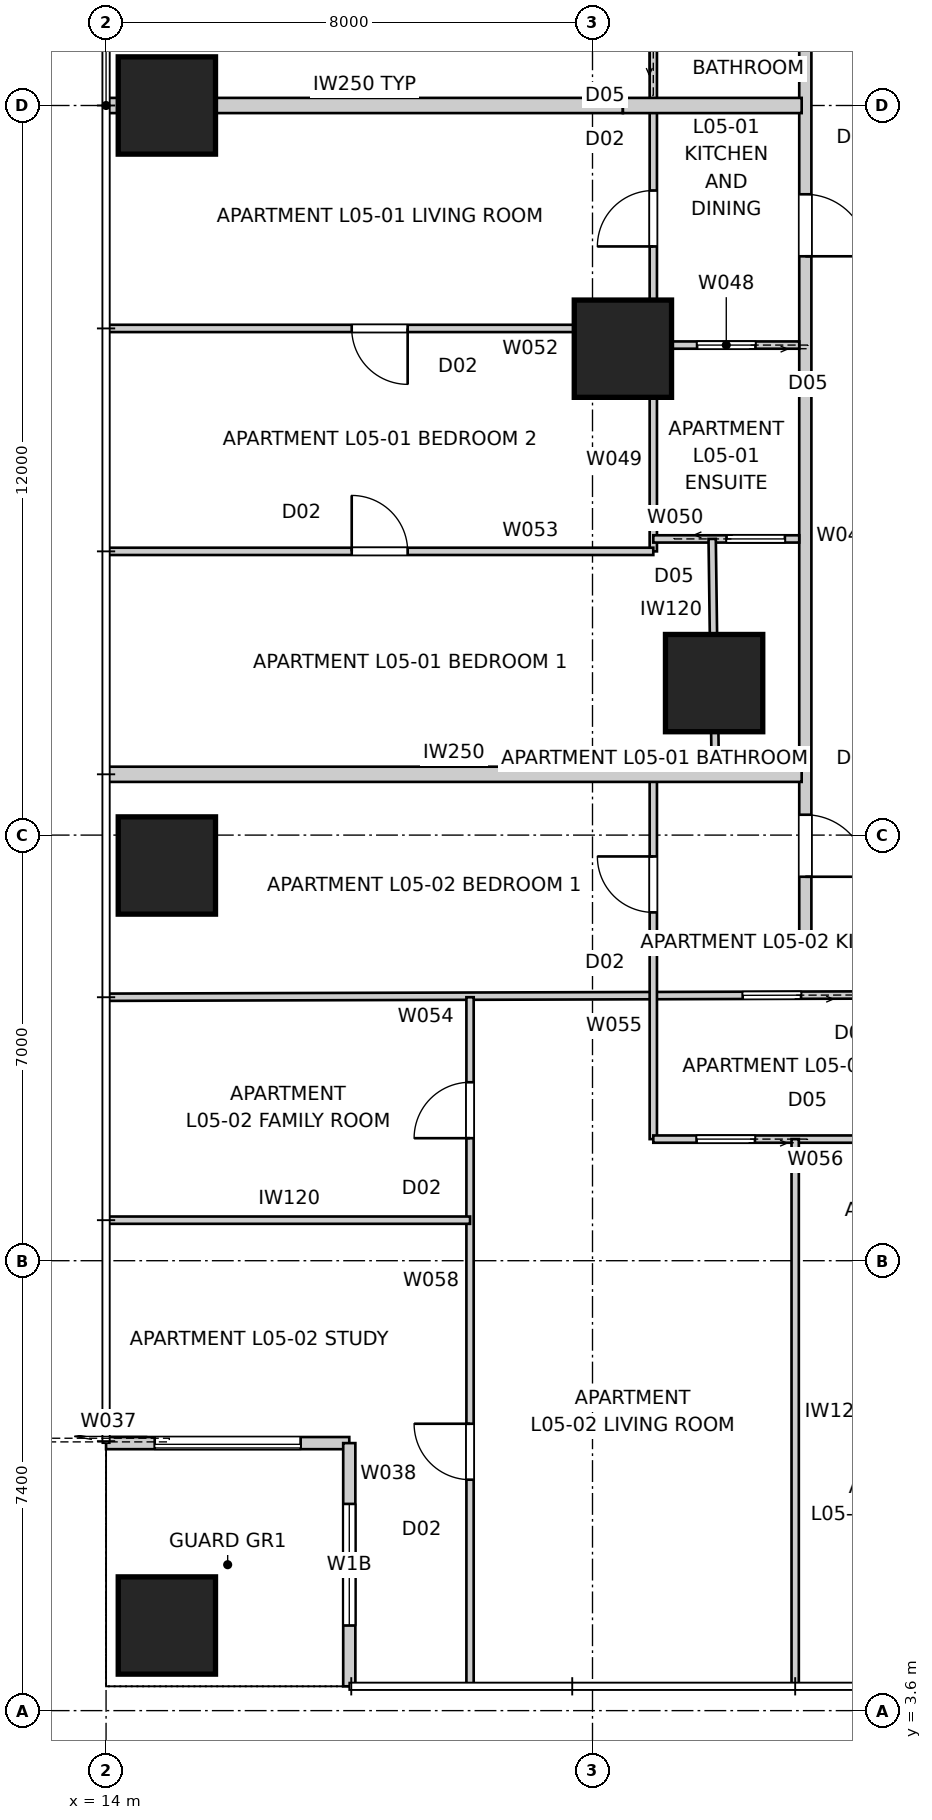
"""IFC4 building model, lengths in metres.
Left out: names, types, materials, properties, quantities, classifications, styles, units other than length and angle.
Written with IfcOpenShell. Run it as: python <this file> out.ifc"""

import sys

from ifc_helpers import new_model, si_unit, direction, frame, frame_2d, origin, origin_2d, place, context, subcontext, project, spatial, rectangle, extrude, element, fill, save


model = new_model("IFC4")
c1 = context("Model", 3, precision=1e-05, world=origin(), true_north=direction((0.0, 1.0)))
c2 = subcontext(c1, "Body", "Model", "MODEL_VIEW")
j1 = project(units=[si_unit("LENGTHUNIT", "METRE"), si_unit("PLANEANGLEUNIT", "RADIAN")], contexts=[c1])
p1 = place(None, origin())
s1 = spatial("IfcSite", under=j1, at=p1, CompositionType="ELEMENT")
p2 = place(p1, origin())
s2 = spatial("IfcBuilding", under=s1, at=p2, CompositionType="ELEMENT")
p3 = place(p2, frame((0.0, 0.0, 21.8)))
s3 = spatial("IfcBuildingStorey", under=s2, at=p3, CompositionType="ELEMENT", Elevation=21.8)
for number, where, z_axis, x_axis in (
    (1, (15.0, 5.0, 0.0), (0.0, 0.0, 1.0), (1.0, 0.0, 0.0)),
    (2, (15.0, 30.0, 0.0), (0.0, 0.0, 1.0), (1.0, 0.0, 0.0)),
    (3, (15.0, 17.5, 0.0), (0.0, 0.0, 1.0), (1.0, 0.0, 0.0)),
    (4, (22.5, 26.0, 0.0), (0.0, 0.0, 1.0), (1.0, 0.0, 0.0)),
    (5, (24.0, 20.5, 0.0), (0.0, 0.0, 1.0), (1.0, 0.0, 0.0)),
):
    element("IfcColumn", number, at=place(p3, frame(where, z_axis=z_axis, x_axis=x_axis)), inside=s3, PredefinedType="COLUMN", context=c2, shape_type="SweptSolid", body=[
        extrude(rectangle(XDim=1.6, YDim=1.6, at=origin_2d()), origin(), (0.0, 0.0, 1.0), 3.4),
    ])
p4 = place(p3, frame((14.0, 8.0, 0.0), z_axis=(0.0, 0.0, 1.0), x_axis=(1.0, 0.0, 0.0)))
e6 = element("IfcWall", 6, at=p4, inside=s3, PredefinedType="SOLIDWALL", context=c2, shape_type="SweptSolid", body=[
    extrude(rectangle(XDim=4.0, YDim=0.2, at=frame_2d((2.0, 0.0))), origin(), (0.0, 0.0, 1.0), 3.25),
])
p5 = place(p4, frame((0.8, 0.0, 0.0)))
e7 = element("IfcOpeningElement", 7, at=p5, cuts=e6, PredefinedType="OPENING", context=c2, shape_type="SweptSolid", body=[
    extrude(rectangle(XDim=2.4, YDim=2.1, at=frame_2d((1.2, 1.05))), frame((0.0, 0.11, 0.0), z_axis=(0.0, -1.0, 0.0), x_axis=(1.0, 0.0, 0.0)), (0.0, 0.0, 1.0), 0.22),
])
p6 = place(p3, frame((18.0, 8.0, 0.0), z_axis=(0.0, 0.0, 1.0), x_axis=(0.0, -1.0, 0.0)))
e8 = element("IfcWall", 8, at=p6, inside=s3, PredefinedType="SOLIDWALL", context=c2, shape_type="SweptSolid", body=[
    extrude(rectangle(XDim=4.0, YDim=0.2, at=frame_2d((2.0, 0.0))), origin(), (0.0, 0.0, 1.0), 3.25),
])
p7 = place(p6, frame((1.0, 0.0, 0.45)))
e9 = element("IfcOpeningElement", 9, at=p7, cuts=e8, PredefinedType="OPENING", context=c2, shape_type="SweptSolid", body=[
    extrude(rectangle(XDim=2.0, YDim=1.8, at=frame_2d((1.0, 0.9))), frame((0.0, 0.11, 0.0), z_axis=(0.0, -1.0, 0.0), x_axis=(1.0, 0.0, 0.0)), (0.0, 0.0, 1.0), 0.22),
])
p8 = place(p3, frame((25.5, 16.3, 0.0), z_axis=(0.0, 0.0, 1.0), x_axis=(1.0, 0.0, 0.0)))
e10 = element("IfcWall", 10, at=p8, inside=s3, PredefinedType="PARTITIONING", context=c2, shape_type="SweptSolid", body=[
    extrude(rectangle(XDim=29.0, YDim=0.2, at=frame_2d((14.5, 0.0))), origin(), (0.0, 0.0, 1.0), 3.25),
])
p9 = place(p8, frame((18.734, 0.0, 0.0)))
e11 = element("IfcOpeningElement", 11, at=p9, cuts=e10, PredefinedType="OPENING", context=c2, shape_type="SweptSolid", body=[
    extrude(rectangle(XDim=1.02, YDim=2.34, at=frame_2d((0.51, 1.17))), frame((0.0, 0.11, 0.0), z_axis=(0.0, -1.0, 0.0), x_axis=(1.0, 0.0, 0.0)), (0.0, 0.0, 1.0), 0.22),
])
p10 = place(p8, frame((5.096, 0.0, 0.0)))
e12 = element("IfcOpeningElement", 12, at=p10, cuts=e10, PredefinedType="OPENING", context=c2, shape_type="SweptSolid", body=[
    extrude(rectangle(XDim=1.02, YDim=2.34, at=frame_2d((0.51, 1.17))), frame((0.0, 0.11, 0.0), z_axis=(0.0, -1.0, 0.0), x_axis=(1.0, 0.0, 0.0)), (0.0, 0.0, 1.0), 0.22),
])
p11 = place(p3, frame((25.5, 43.7, 0.0), z_axis=(0.0, 0.0, 1.0), x_axis=(0.0, -1.0, 0.0)))
e13 = element("IfcWall", 13, at=p11, inside=s3, PredefinedType="PARTITIONING", context=c2, shape_type="SweptSolid", body=[
    extrude(rectangle(XDim=27.4, YDim=0.2, at=frame_2d((13.7, 0.0))), origin(), (0.0, 0.0, 1.0), 3.25),
])
p12 = place(p11, frame((5.493, 0.0, 0.0)))
e14 = element("IfcOpeningElement", 14, at=p12, cuts=e13, PredefinedType="OPENING", context=c2, shape_type="SweptSolid", body=[
    extrude(rectangle(XDim=1.02, YDim=2.34, at=frame_2d((0.51, 1.17))), frame((0.0, 0.11, 0.0), z_axis=(0.0, -1.0, 0.0), x_axis=(1.0, 0.0, 0.0)), (0.0, 0.0, 1.0), 0.22),
])
p13 = place(p11, frame((15.16, 0.0, 0.0)))
e15 = element("IfcOpeningElement", 15, at=p13, cuts=e13, PredefinedType="OPENING", context=c2, shape_type="SweptSolid", body=[
    extrude(rectangle(XDim=1.02, YDim=2.34, at=frame_2d((0.51, 1.17))), frame((0.0, 0.11, 0.0), z_axis=(0.0, -1.0, 0.0), x_axis=(1.0, 0.0, 0.0)), (0.0, 0.0, 1.0), 0.22),
])
p14 = place(p11, frame((25.365, 0.0, 0.0)))
e16 = element("IfcOpeningElement", 16, at=p14, cuts=e13, PredefinedType="OPENING", context=c2, shape_type="SweptSolid", body=[
    extrude(rectangle(XDim=1.02, YDim=2.34, at=frame_2d((0.51, 1.17))), frame((0.0, 0.11, 0.0), z_axis=(0.0, -1.0, 0.0), x_axis=(1.0, 0.0, 0.0)), (0.0, 0.0, 1.0), 0.22),
])
p15 = place(p11, frame((1.015, 0.0, 0.0)))
e17 = element("IfcOpeningElement", 17, at=p15, cuts=e13, PredefinedType="OPENING", context=c2, shape_type="SweptSolid", body=[
    extrude(rectangle(XDim=1.02, YDim=2.34, at=frame_2d((0.51, 1.17))), frame((0.0, 0.11, 0.0), z_axis=(0.0, -1.0, 0.0), x_axis=(1.0, 0.0, 0.0)), (0.0, 0.0, 1.0), 0.22),
])
p16 = place(p3, frame((14.0, 30.0, 0.0), z_axis=(0.0, 0.0, 1.0), x_axis=(1.0, 0.0, 0.0)))
e18 = element("IfcWall", 18, at=p16, inside=s3, PredefinedType="PARTITIONING", context=c2, shape_type="SweptSolid", body=[
    extrude(rectangle(XDim=8.5, YDim=0.25, at=frame_2d((4.25, 0.0))), origin(), (0.0, 0.0, 1.0), 3.25),
])
p17 = place(p3, frame((22.5, 30.0, 0.0), z_axis=(0.0, 0.0, 1.0), x_axis=(1.0, 0.0, 0.0)))
e19 = element("IfcWall", 19, at=p17, inside=s3, PredefinedType="PARTITIONING", context=c2, shape_type="SweptSolid", body=[
    extrude(rectangle(XDim=2.94, YDim=0.25, at=frame_2d((1.47, 0.0))), origin(), (0.0, 0.0, 1.0), 2.796),
])
p18 = place(p3, frame((14.0, 19.0, 0.0), z_axis=(0.0, 0.0, 1.0), x_axis=(1.0, 0.0, 0.0)))
e20 = element("IfcWall", 20, at=p18, inside=s3, PredefinedType="PARTITIONING", context=c2, shape_type="SweptSolid", body=[
    extrude(rectangle(XDim=11.44, YDim=0.25, at=frame_2d((5.72, 0.0))), origin(), (0.0, 0.0, 1.0), 3.25),
])
p19 = place(p3, frame((25.4, 26.06, 0.0), z_axis=(0.0, 0.0, 1.0), x_axis=(-1.0, 0.0, 0.0)))
e21 = element("IfcWall", 21, at=p19, inside=s3, PredefinedType="PARTITIONING", context=c2, shape_type="SweptSolid", body=[
    extrude(rectangle(XDim=2.4, YDim=0.12, at=frame_2d((1.2, 0.0))), origin(), (0.0, 0.0, 1.0), 3.25),
])
p20 = place(p19, frame((0.72, 0.0, 0.0)))
e22 = element("IfcOpeningElement", 22, at=p20, cuts=e21, PredefinedType="OPENING", context=c2, shape_type="SweptSolid", body=[
    extrude(rectangle(XDim=0.96, YDim=2.1, at=frame_2d((0.48, 1.05))), frame((0.0, 0.07, 0.0), z_axis=(0.0, -1.0, 0.0), x_axis=(1.0, 0.0, 0.0)), (0.0, 0.0, 1.0), 0.14),
])
p21 = place(p3, frame((23.0, 22.667, 0.0), z_axis=(0.0, 0.0, 1.0), x_axis=(0.0, 1.0, 0.0)))
e23 = element("IfcWall", 23, at=p21, inside=s3, PredefinedType="PARTITIONING", context=c2, shape_type="SweptSolid", body=[
    extrude(rectangle(XDim=15.233, YDim=0.12, at=frame_2d((7.617, 0.0))), origin(), (0.0, 0.0, 1.0), 2.549),
])
p22 = place(p21, frame((13.362, 0.0, 0.0)))
e24 = element("IfcOpeningElement", 24, at=p22, cuts=e23, PredefinedType="OPENING", context=c2, shape_type="SweptSolid", body=[
    extrude(rectangle(XDim=0.92, YDim=2.34, at=frame_2d((0.46, 1.17))), frame((0.0, 0.07, 0.0), z_axis=(0.0, -1.0, 0.0), x_axis=(1.0, 0.0, 0.0)), (0.0, 0.0, 1.0), 0.14),
])
p23 = place(p21, frame((5.015, 0.0, 0.0)))
e25 = element("IfcOpeningElement", 25, at=p23, cuts=e23, PredefinedType="OPENING", context=c2, shape_type="SweptSolid", body=[
    extrude(rectangle(XDim=0.92, YDim=2.34, at=frame_2d((0.46, 1.17))), frame((0.0, 0.07, 0.0), z_axis=(0.0, -1.0, 0.0), x_axis=(1.0, 0.0, 0.0)), (0.0, 0.0, 1.0), 0.14),
])
p24 = place(p21, frame((8.362, 0.0, 0.0)))
e26 = element("IfcOpeningElement", 26, at=p24, cuts=e23, PredefinedType="OPENING", context=c2, shape_type="SweptSolid", body=[
    extrude(rectangle(XDim=0.96, YDim=2.1, at=frame_2d((0.48, 1.05))), frame((0.0, 0.07, 0.0), z_axis=(0.0, -1.0, 0.0), x_axis=(1.0, 0.0, 0.0)), (0.0, 0.0, 1.0), 0.14),
])
p25 = place(p3, frame((23.0, 22.871, 0.0), z_axis=(0.0, 0.0, 1.0), x_axis=(1.0, 0.0, 0.0)))
e27 = element("IfcWall", 27, at=p25, inside=s3, PredefinedType="PARTITIONING", context=c2, shape_type="SweptSolid", body=[
    extrude(rectangle(XDim=2.4, YDim=0.12, at=frame_2d((1.2, 0.0))), origin(), (0.0, 0.0, 1.0), 3.25),
])
p26 = place(p25, frame((1.204, 0.0, 0.0)))
e28 = element("IfcOpeningElement", 28, at=p26, cuts=e27, PredefinedType="OPENING", context=c2, shape_type="SweptSolid", body=[
    extrude(rectangle(XDim=0.96, YDim=2.1, at=frame_2d((0.48, 1.05))), frame((0.0, 0.07, 0.0), z_axis=(0.0, -1.0, 0.0), x_axis=(1.0, 0.0, 0.0)), (0.0, 0.0, 1.0), 0.14),
])
p27 = place(p3, frame((24.02, 19.0, 0.0), z_axis=(0.0, 0.0, 1.0), x_axis=(-0.013494388256, 0.999908946597, 0.0)))
e29 = element("IfcWall", 29, at=p27, inside=s3, PredefinedType="PARTITIONING", context=c2, shape_type="SweptSolid", body=[
    extrude(rectangle(XDim=3.872, YDim=0.12, at=frame_2d((1.936, 0.0))), origin(), (0.0, 0.0, 1.0), 2.549),
])
p28 = place(p3, frame((23.0, 26.333, 0.0), z_axis=(0.0, 0.0, 1.0), x_axis=(-1.0, 0.0, 0.0)))
e30 = element("IfcWall", 30, at=p28, inside=s3, PredefinedType="PARTITIONING", context=c2, shape_type="SweptSolid", body=[
    extrude(rectangle(XDim=8.96, YDim=0.12, at=frame_2d((4.48, 0.0))), origin(), (0.0, 0.0, 1.0), 3.25),
])
p29 = place(p28, frame((4.04, 0.0, 0.0)))
e31 = element("IfcOpeningElement", 31, at=p29, cuts=e30, PredefinedType="OPENING", context=c2, shape_type="SweptSolid", body=[
    extrude(rectangle(XDim=0.92, YDim=2.34, at=frame_2d((0.46, 1.17))), frame((0.0, 0.07, 0.0), z_axis=(0.0, -1.0, 0.0), x_axis=(1.0, 0.0, 0.0)), (0.0, 0.0, 1.0), 0.14),
])
p30 = place(p3, frame((14.04, 22.667, 0.0), z_axis=(0.0, 0.0, 1.0), x_axis=(1.0, 0.0, 0.0)))
e32 = element("IfcWall", 32, at=p30, inside=s3, PredefinedType="PARTITIONING", context=c2, shape_type="SweptSolid", body=[
    extrude(rectangle(XDim=8.96, YDim=0.12, at=frame_2d((4.48, 0.0))), origin(), (0.0, 0.0, 1.0), 3.25),
])
p31 = place(p30, frame((4.0, 0.0, 0.0)))
e33 = element("IfcOpeningElement", 33, at=p31, cuts=e32, PredefinedType="OPENING", context=c2, shape_type="SweptSolid", body=[
    extrude(rectangle(XDim=0.92, YDim=2.34, at=frame_2d((0.46, 1.17))), frame((0.0, 0.07, 0.0), z_axis=(0.0, -1.0, 0.0), x_axis=(1.0, 0.0, 0.0)), (0.0, 0.0, 1.0), 0.14),
])
p32 = place(p3, frame((29.0, 15.378, 0.0), z_axis=(0.0, 0.0, 1.0), x_axis=(-0.999995589081, -0.002970154664, 0.0)))
e34 = element("IfcWall", 34, at=p32, inside=s3, PredefinedType="PARTITIONING", context=c2, shape_type="SweptSolid", body=[
    extrude(rectangle(XDim=14.96, YDim=0.12, at=frame_2d((7.48, 0.0))), origin(), (0.0, 0.0, 1.0), 2.638),
])
p33 = place(p32, frame((3.57, 0.0, 0.0)))
e35 = element("IfcOpeningElement", 35, at=p33, cuts=e34, PredefinedType="OPENING", context=c2, shape_type="SweptSolid", body=[
    extrude(rectangle(XDim=0.96, YDim=2.1, at=frame_2d((0.48, 1.05))), frame((0.0, 0.07, 0.0), z_axis=(0.0, -1.0, 0.0), x_axis=(1.0, 0.0, 0.0)), (0.0, 0.0, 1.0), 0.14),
])
p34 = place(p3, frame((23.0, 13.0, 0.0), z_axis=(0.0, 0.0, 1.0), x_axis=(0.0, 1.0, 0.0)))
e36 = element("IfcWall", 36, at=p34, inside=s3, PredefinedType="PARTITIONING", context=c2, shape_type="SweptSolid", body=[
    extrude(rectangle(XDim=6.0, YDim=0.12, at=frame_2d((3.0, 0.0))), origin(), (0.0, 0.0, 1.0), 3.25),
])
p35 = place(p34, frame((3.729, 0.0, 0.0)))
e37 = element("IfcOpeningElement", 37, at=p35, cuts=e36, PredefinedType="OPENING", context=c2, shape_type="SweptSolid", body=[
    extrude(rectangle(XDim=0.92, YDim=2.34, at=frame_2d((0.46, 1.17))), frame((0.0, 0.07, 0.0), z_axis=(0.0, -1.0, 0.0), x_axis=(1.0, 0.0, 0.0)), (0.0, 0.0, 1.0), 0.14),
])
p36 = place(p3, frame((29.0, 13.0, 0.0), z_axis=(0.0, 0.0, 1.0), x_axis=(-1.0, 0.0, 0.0)))
e38 = element("IfcWall", 38, at=p36, inside=s3, PredefinedType="PARTITIONING", context=c2, shape_type="SweptSolid", body=[
    extrude(rectangle(XDim=6.0, YDim=0.12, at=frame_2d((3.0, 0.0))), origin(), (0.0, 0.0, 1.0), 3.25),
])
p37 = place(p36, frame((1.378, 0.0, 0.0)))
e39 = element("IfcOpeningElement", 39, at=p37, cuts=e38, PredefinedType="OPENING", context=c2, shape_type="SweptSolid", body=[
    extrude(rectangle(XDim=0.96, YDim=2.1, at=frame_2d((0.48, 1.05))), frame((0.0, 0.07, 0.0), z_axis=(0.0, -1.0, 0.0), x_axis=(1.0, 0.0, 0.0)), (0.0, 0.0, 1.0), 0.14),
])
p38 = place(p36, frame((4.328, 0.0, 0.0)))
e40 = element("IfcOpeningElement", 40, at=p38, cuts=e38, PredefinedType="OPENING", context=c2, shape_type="SweptSolid", body=[
    extrude(rectangle(XDim=0.96, YDim=2.1, at=frame_2d((0.48, 1.05))), frame((0.0, 0.07, 0.0), z_axis=(0.0, -1.0, 0.0), x_axis=(1.0, 0.0, 0.0)), (0.0, 0.0, 1.0), 0.14),
])
p39 = place(p3, frame((25.333, 13.0, 0.0), z_axis=(0.0, 0.0, 1.0), x_axis=(0.0, -1.0, 0.0)))
e41 = element("IfcWall", 41, at=p39, inside=s3, PredefinedType="PARTITIONING", context=c2, shape_type="SweptSolid", body=[
    extrude(rectangle(XDim=8.96, YDim=0.12, at=frame_2d((4.48, 0.0))), origin(), (0.0, 0.0, 1.0), 2.638),
])
p40 = place(p3, frame((19.986, 4.04, 0.0), z_axis=(0.0, 0.0, 1.0), x_axis=(0.0, 1.0, 0.0)))
e42 = element("IfcWall", 42, at=p40, inside=s3, PredefinedType="PARTITIONING", context=c2, shape_type="SweptSolid", body=[
    extrude(rectangle(XDim=11.293, YDim=0.12, at=frame_2d((5.646, 0.0))), origin(), (0.0, 0.0, 1.0), 3.25),
])
p41 = place(p40, frame((3.358, 0.0, 0.0)))
e43 = element("IfcOpeningElement", 43, at=p41, cuts=e42, PredefinedType="OPENING", context=c2, shape_type="SweptSolid", body=[
    extrude(rectangle(XDim=0.92, YDim=2.34, at=frame_2d((0.46, 1.17))), frame((0.0, 0.07, 0.0), z_axis=(0.0, -1.0, 0.0), x_axis=(1.0, 0.0, 0.0)), (0.0, 0.0, 1.0), 0.14),
])
p42 = place(p40, frame((8.975, 0.0, 0.0)))
e44 = element("IfcOpeningElement", 44, at=p42, cuts=e42, PredefinedType="OPENING", context=c2, shape_type="SweptSolid", body=[
    extrude(rectangle(XDim=0.92, YDim=2.34, at=frame_2d((0.46, 1.17))), frame((0.0, 0.07, 0.0), z_axis=(0.0, -1.0, 0.0), x_axis=(1.0, 0.0, 0.0)), (0.0, 0.0, 1.0), 0.14),
])
p43 = place(p3, frame((14.04, 11.667, 0.0), z_axis=(0.0, 0.0, 1.0), x_axis=(1.0, 0.0, 0.0)))
e45 = element("IfcWall", 45, at=p43, inside=s3, PredefinedType="PARTITIONING", context=c2, shape_type="SweptSolid", body=[
    extrude(rectangle(XDim=5.946, YDim=0.12, at=frame_2d((2.973, 0.0))), origin(), (0.0, 0.0, 1.0), 3.25),
])
p44 = place(p5, origin())
e46 = element("IfcDoor", 46, at=p44, inside=s3, OperationType="SLIDING_TO_LEFT", PredefinedType="DOOR", context=c2, shape_type="SweptSolid", body=[
    extrude(rectangle(XDim=2.4, YDim=2.1, at=frame_2d((1.2, 1.05))), frame((0.0, 0.025, 0.0), z_axis=(0.0, -1.0, 0.0), x_axis=(1.0, 0.0, 0.0)), (0.0, 0.0, 1.0), 0.05),
])
fill(e7, e46)
p45 = place(p7, origin())
e47 = element("IfcWindow", 47, at=p45, inside=s3, PartitioningType="SINGLE_PANEL", PredefinedType="WINDOW", context=c2, shape_type="SweptSolid", body=[
    extrude(rectangle(XDim=2.0, YDim=1.8, at=frame_2d((1.0, 0.9))), frame((0.0, 0.03, 0.0), z_axis=(0.0, -1.0, 0.0), x_axis=(1.0, 0.0, 0.0)), (0.0, 0.0, 1.0), 0.06),
])
fill(e9, e47)
p46 = place(p13, origin())
e48 = element("IfcDoor", 48, at=p46, inside=s3, OperationType="SINGLE_SWING_RIGHT", PredefinedType="DOOR", context=c2, shape_type="SweptSolid", body=[
    extrude(rectangle(XDim=1.02, YDim=2.34, at=frame_2d((0.51, 1.17))), frame((0.0, 0.025, 0.0), z_axis=(0.0, -1.0, 0.0), x_axis=(1.0, 0.0, 0.0)), (0.0, 0.0, 1.0), 0.05),
])
fill(e15, e48)
p47 = place(p14, origin())
e49 = element("IfcDoor", 49, at=p47, inside=s3, OperationType="SINGLE_SWING_RIGHT", PredefinedType="DOOR", context=c2, shape_type="SweptSolid", body=[
    extrude(rectangle(XDim=1.02, YDim=2.34, at=frame_2d((0.51, 1.17))), frame((0.0, 0.025, 0.0), z_axis=(0.0, -1.0, 0.0), x_axis=(1.0, 0.0, 0.0)), (0.0, 0.0, 1.0), 0.05),
])
fill(e16, e49)
p48 = place(p23, origin())
e50 = element("IfcDoor", 50, at=p48, inside=s3, OperationType="SINGLE_SWING_LEFT", PredefinedType="DOOR", context=c2, shape_type="SweptSolid", body=[
    extrude(rectangle(XDim=0.92, YDim=2.34, at=frame_2d((0.46, 1.17))), frame((0.0, 0.025, 0.0), z_axis=(0.0, -1.0, 0.0), x_axis=(1.0, 0.0, 0.0)), (0.0, 0.0, 1.0), 0.05),
])
fill(e25, e50)
p49 = place(p20, origin())
e51 = element("IfcDoor", 51, at=p49, inside=s3, OperationType="SLIDING_TO_LEFT", PredefinedType="DOOR", context=c2, shape_type="SweptSolid", body=[
    extrude(rectangle(XDim=0.96, YDim=2.1, at=frame_2d((0.48, 1.05))), frame((0.0, 0.025, 0.0), z_axis=(0.0, -1.0, 0.0), x_axis=(1.0, 0.0, 0.0)), (0.0, 0.0, 1.0), 0.05),
])
fill(e22, e51)
p50 = place(p33, origin())
e52 = element("IfcDoor", 52, at=p50, inside=s3, OperationType="SLIDING_TO_LEFT", PredefinedType="DOOR", context=c2, shape_type="SweptSolid", body=[
    extrude(rectangle(XDim=0.96, YDim=2.1, at=frame_2d((0.48, 1.05))), frame((0.0, 0.025, 0.0), z_axis=(0.0, -1.0, 0.0), x_axis=(1.0, 0.0, 0.0)), (0.0, 0.0, 1.0), 0.05),
])
fill(e35, e52)
p51 = place(p35, origin())
e53 = element("IfcDoor", 53, at=p51, inside=s3, OperationType="SINGLE_SWING_RIGHT", PredefinedType="DOOR", context=c2, shape_type="SweptSolid", body=[
    extrude(rectangle(XDim=0.92, YDim=2.34, at=frame_2d((0.46, 1.17))), frame((0.0, 0.025, 0.0), z_axis=(0.0, -1.0, 0.0), x_axis=(1.0, 0.0, 0.0)), (0.0, 0.0, 1.0), 0.05),
])
fill(e37, e53)
p52 = place(p29, origin())
e54 = element("IfcDoor", 54, at=p52, inside=s3, OperationType="SINGLE_SWING_LEFT", PredefinedType="DOOR", context=c2, shape_type="SweptSolid", body=[
    extrude(rectangle(XDim=0.92, YDim=2.34, at=frame_2d((0.46, 1.17))), frame((0.0, 0.025, 0.0), z_axis=(0.0, -1.0, 0.0), x_axis=(1.0, 0.0, 0.0)), (0.0, 0.0, 1.0), 0.05),
])
fill(e31, e54)
p53 = place(p26, origin())
e55 = element("IfcDoor", 55, at=p53, inside=s3, OperationType="SLIDING_TO_LEFT", PredefinedType="DOOR", context=c2, shape_type="SweptSolid", body=[
    extrude(rectangle(XDim=0.96, YDim=2.1, at=frame_2d((0.48, 1.05))), frame((0.0, 0.025, 0.0), z_axis=(0.0, -1.0, 0.0), x_axis=(1.0, 0.0, 0.0)), (0.0, 0.0, 1.0), 0.05),
])
fill(e28, e55)
p54 = place(p38, origin())
e56 = element("IfcDoor", 56, at=p54, inside=s3, OperationType="SLIDING_TO_LEFT", PredefinedType="DOOR", context=c2, shape_type="SweptSolid", body=[
    extrude(rectangle(XDim=0.96, YDim=2.1, at=frame_2d((0.48, 1.05))), frame((0.0, 0.025, 0.0), z_axis=(0.0, -1.0, 0.0), x_axis=(1.0, 0.0, 0.0)), (0.0, 0.0, 1.0), 0.05),
])
fill(e40, e56)
p55 = place(p41, origin())
e57 = element("IfcDoor", 57, at=p55, inside=s3, OperationType="SINGLE_SWING_RIGHT", PredefinedType="DOOR", context=c2, shape_type="SweptSolid", body=[
    extrude(rectangle(XDim=0.92, YDim=2.34, at=frame_2d((0.46, 1.17))), frame((0.0, 0.025, 0.0), z_axis=(0.0, -1.0, 0.0), x_axis=(1.0, 0.0, 0.0)), (0.0, 0.0, 1.0), 0.05),
])
fill(e43, e57)
p56 = place(p42, origin())
e58 = element("IfcDoor", 58, at=p56, inside=s3, OperationType="SINGLE_SWING_LEFT", PredefinedType="DOOR", context=c2, shape_type="SweptSolid", body=[
    extrude(rectangle(XDim=0.92, YDim=2.34, at=frame_2d((0.46, 1.17))), frame((0.0, 0.025, 0.0), z_axis=(0.0, -1.0, 0.0), x_axis=(1.0, 0.0, 0.0)), (0.0, 0.0, 1.0), 0.05),
])
fill(e44, e58)
p57 = place(p31, origin())
e59 = element("IfcDoor", 59, at=p57, inside=s3, OperationType="SINGLE_SWING_LEFT", PredefinedType="DOOR", context=c2, shape_type="SweptSolid", body=[
    extrude(rectangle(XDim=0.92, YDim=2.34, at=frame_2d((0.46, 1.17))), frame((0.0, 0.025, 0.0), z_axis=(0.0, -1.0, 0.0), x_axis=(1.0, 0.0, 0.0)), (0.0, 0.0, 1.0), 0.05),
])
fill(e33, e59)
save(model, sys.argv[1])
